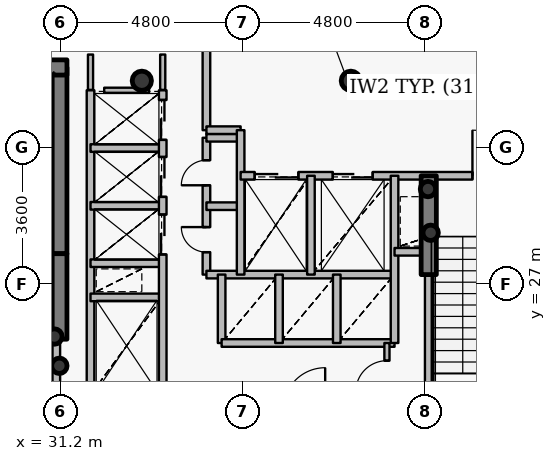
"""IFC4 building model, lengths in metres.
Left out: names, types, materials, properties, quantities, classifications, styles, units other than length and angle.
Written with IfcOpenShell. Run it as: python <this file> out.ifc"""

import sys

from ifc_helpers import new_model, si_unit, direction, frame, frame_2d, origin, origin_2d, place, context, subcontext, project, spatial, rectangle, hollow_circle, extrude, source, transform, mapped, element, fill, save


model = new_model("IFC4")
c1 = context("Model", 3, precision=1e-05, world=origin(), true_north=direction((0.0, 1.0)))
c2 = subcontext(c1, "Body", "Model", "MODEL_VIEW")
j1 = project(units=[si_unit("LENGTHUNIT", "METRE"), si_unit("PLANEANGLEUNIT", "RADIAN")], contexts=[c1])
p1 = place(None, origin())
s1 = spatial("IfcSite", under=j1, at=p1, CompositionType="ELEMENT")
p2 = place(p1, origin())
s2 = spatial("IfcBuilding", under=s1, at=p2, CompositionType="ELEMENT")
p3 = place(p2, frame((0.0, 0.0, 225.3)))
s3 = spatial("IfcBuildingStorey", under=s2, at=p3, CompositionType="ELEMENT", Elevation=225.3)
for number, where, z_axis, x_axis in (
    (1, (38.85, 32.35, 0.0), (0.0, 0.0, 1.0), (1.0, 0.0, 0.0)),
    (2, (33.35, 32.35, 0.0), (0.0, 0.0, 1.0), (1.0, 0.0, 0.0)),
):
    element("IfcColumn", number, at=place(p3, frame(where, z_axis=z_axis, x_axis=x_axis)), inside=s3, PredefinedType="COLUMN", context=c2, shape_type="SweptSolid", body=[
        extrude(hollow_circle(Radius=0.254, WallThickness=0.02, at=origin_2d()), origin(), (0.0, 0.0, 1.0), 3.75),
    ])
p4 = place(p3, frame((31.18, 27.8, 0.0), z_axis=(0.0, 0.0, 1.0), x_axis=(0.0, 1.0, 0.0)))
e3 = element("IfcWall", 3, at=p4, inside=s3, PredefinedType="SHEAR", context=c2, shape_type="SweptSolid", body=[
    extrude(rectangle(XDim=4.9, YDim=0.4, at=frame_2d((2.45, 0.0))), origin(), (0.0, 0.0, 1.0), 3.75),
])
p5 = place(p3, frame((27.28, 32.7, 0.0), z_axis=(0.0, 0.0, 1.0), x_axis=(1.0, 0.0, 0.0)))
e4 = element("IfcWall", 4, at=p5, inside=s3, PredefinedType="SHEAR", context=c2, shape_type="SweptSolid", body=[
    extrude(rectangle(XDim=4.1, YDim=0.4, at=frame_2d((2.05, 0.0))), origin(), (0.0, 0.0, 1.0), 3.75),
])
for number, where, z_axis, x_axis in (
    (5, (31.05, 25.62, 0.0), (0.0, 0.0, 1.0), (1.0, 0.0, 0.0)),
    (6, (31.18, 24.85, 0.0), (0.0, 0.0, 1.0), (1.0, 0.0, 0.0)),
    (7, (40.95, 28.35, 0.0), (0.0, 0.0, 1.0), (1.0, 0.0, 0.0)),
    (8, (40.88, 29.5, 0.0), (0.0, 0.0, 1.0), (1.0, 0.0, 0.0)),
):
    element("IfcColumn", number, at=place(p3, frame(where, z_axis=z_axis, x_axis=x_axis)), inside=s3, PredefinedType="COLUMN", context=c2, shape_type="SweptSolid", body=[
        extrude(hollow_circle(Radius=0.203, WallThickness=0.016, at=origin_2d()), origin(), (0.0, 0.0, 1.0), 3.75),
    ])
p6 = place(p3, frame((31.18, 25.55, 0.0), z_axis=(0.0, 0.0, 1.0), x_axis=(0.0, 1.0, 0.0)))
e9 = element("IfcWall", 9, at=p6, inside=s3, PredefinedType="SHEAR", context=c2, shape_type="SweptSolid", body=[
    extrude(rectangle(XDim=2.25, YDim=0.4, at=frame_2d((1.125, 0.0))), origin(), (0.0, 0.0, 1.0), 3.1),
])
p7 = place(p3, frame((40.9, 27.25, 0.0), z_axis=(0.0, 0.0, 1.0), x_axis=(0.0, 1.0, 0.0)))
e10 = element("IfcWall", 10, at=p7, inside=s3, PredefinedType="SHEAR", context=c2, shape_type="SweptSolid", body=[
    extrude(rectangle(XDim=2.6, YDim=0.4, at=frame_2d((1.3, 0.0))), origin(), (0.0, 0.0, 1.0), 3.1),
])
p8 = place(p3, frame((31.1, 24.1, 0.0), z_axis=(0.0, 0.0, 1.0), x_axis=(0.0, 1.0, 0.0)))
e11 = element("IfcWall", 11, at=p8, inside=s3, PredefinedType="PARTITIONING", context=c2, shape_type="SweptSolid", body=[
    extrude(rectangle(XDim=1.44, YDim=0.2, at=frame_2d((0.72, 0.0))), origin(), (0.0, 0.0, 1.0), 3.5),
])
p9 = place(p3, frame((32.0, 24.1, 0.0), z_axis=(0.0, 0.0, 1.0), x_axis=(0.0, 1.0, 0.0)))
e12 = element("IfcWall", 12, at=p9, inside=s3, PredefinedType="PARTITIONING", context=c2, shape_type="SweptSolid", body=[
    extrude(rectangle(XDim=8.0, YDim=0.2, at=frame_2d((4.0, 0.0))), origin(), (0.0, 0.0, 1.0), 3.5),
])
for number, where, z_axis, x_axis in (
    (13, (32.0, 26.65, 0.0), (0.0, 0.0, 1.0), (1.0, 0.0, 0.0)),
    (14, (32.0, 27.55, 0.0), (0.0, 0.0, 1.0), (1.0, 0.0, 0.0)),
    (15, (32.0, 29.06, 0.0), (0.0, 0.0, 1.0), (1.0, 0.0, 0.0)),
    (16, (32.0, 30.58, 0.0), (0.0, 0.0, 1.0), (1.0, 0.0, 0.0)),
):
    element("IfcWall", number, at=place(p3, frame(where, z_axis=z_axis, x_axis=x_axis)), inside=s3, PredefinedType="PARTITIONING", context=c2, shape_type="SweptSolid", body=[
        extrude(rectangle(XDim=1.9, YDim=0.2, at=frame_2d((0.95, 0.0))), origin(), (0.0, 0.0, 1.0), 3.085),
    ])
p10 = place(p3, frame((33.9, 20.7, 0.0), z_axis=(0.0, 0.0, 1.0), x_axis=(0.0, 1.0, 0.0)))
e17 = element("IfcWall", 17, at=p10, inside=s3, PredefinedType="PARTITIONING", context=c2, shape_type="SweptSolid", body=[
    extrude(rectangle(XDim=11.4, YDim=0.2, at=frame_2d((5.7, 0.0))), origin(), (0.0, 0.0, 1.0), 3.085),
])
p11 = place(p10, frame((7.08, 0.0, 0.0)))
e18 = element("IfcOpeningElement", 18, at=p11, cuts=e17, PredefinedType="OPENING", context=c2, shape_type="SweptSolid", body=[
    extrude(rectangle(XDim=1.05, YDim=2.15, at=origin_2d()), frame((0.525, 0.11, 1.075), z_axis=(0.0, -1.0, 0.0), x_axis=(1.0, 0.0, 0.0)), (0.0, 0.0, 1.0), 0.22),
])
p12 = place(p10, frame((8.595, 0.0, 0.0)))
e19 = element("IfcOpeningElement", 19, at=p12, cuts=e17, PredefinedType="OPENING", context=c2, shape_type="SweptSolid", body=[
    extrude(rectangle(XDim=1.05, YDim=2.15, at=origin_2d()), frame((0.525, 0.11, 1.075), z_axis=(0.0, -1.0, 0.0), x_axis=(1.0, 0.0, 0.0)), (0.0, 0.0, 1.0), 0.22),
])
p13 = place(p10, frame((10.095, 0.0, 0.0)))
e20 = element("IfcOpeningElement", 20, at=p13, cuts=e17, PredefinedType="OPENING", context=c2, shape_type="SweptSolid", body=[
    extrude(rectangle(XDim=1.05, YDim=2.15, at=origin_2d()), frame((0.525, 0.11, 1.075), z_axis=(0.0, -1.0, 0.0), x_axis=(1.0, 0.0, 0.0)), (0.0, 0.0, 1.0), 0.22),
])
p14 = place(p3, frame((35.05, 27.25, 0.0), z_axis=(0.0, 0.0, 1.0), x_axis=(0.0, 1.0, 0.0)))
e21 = element("IfcWall", 21, at=p14, inside=s3, PredefinedType="PARTITIONING", context=c2, shape_type="SweptSolid", body=[
    extrude(rectangle(XDim=3.6, YDim=0.2, at=frame_2d((1.8, 0.0))), origin(), (0.0, 0.0, 1.0), 3.5),
])
p15 = place(p14, frame((0.59, 0.0, 0.0)))
e22 = element("IfcOpeningElement", 22, at=p15, cuts=e21, PredefinedType="OPENING", context=c2, shape_type="SweptSolid", body=[
    extrude(rectangle(XDim=0.66, YDim=2.05, at=origin_2d()), frame((0.33, 0.11, 1.025), z_axis=(0.0, -1.0, 0.0), x_axis=(1.0, 0.0, 0.0)), (0.0, 0.0, 1.0), 0.22),
])
p16 = place(p14, frame((2.35, 0.0, 0.0)))
e23 = element("IfcOpeningElement", 23, at=p16, cuts=e21, PredefinedType="OPENING", context=c2, shape_type="SweptSolid", body=[
    extrude(rectangle(XDim=0.66, YDim=2.05, at=origin_2d()), frame((0.33, 0.11, 1.025), z_axis=(0.0, -1.0, 0.0), x_axis=(1.0, 0.0, 0.0)), (0.0, 0.0, 1.0), 0.22),
])
p17 = place(p3, frame((35.05, 27.25, 0.0), z_axis=(0.0, 0.0, 1.0), x_axis=(1.0, 0.0, 0.0)))
e24 = element("IfcWall", 24, at=p17, inside=s3, PredefinedType="PARTITIONING", context=c2, shape_type="SweptSolid", body=[
    extrude(rectangle(XDim=4.95, YDim=0.2, at=frame_2d((2.475, 0.0))), origin(), (0.0, 0.0, 1.0), 3.085),
])
for number, where, z_axis, x_axis in (
    (25, (35.05, 29.05, 0.0), (0.0, 0.0, 1.0), (1.0, 0.0, 0.0)),
    (26, (35.05, 30.85, 0.0), (0.0, 0.0, 1.0), (1.0, 0.0, 0.0)),
):
    element("IfcWall", number, at=place(p3, frame(where, z_axis=z_axis, x_axis=x_axis)), inside=s3, PredefinedType="PARTITIONING", context=c2, shape_type="SweptSolid", body=[
        extrude(rectangle(XDim=0.9, YDim=0.2, at=frame_2d((0.45, 0.0))), origin(), (0.0, 0.0, 1.0), 3.5),
    ])
p18 = place(p3, frame((35.05, 31.05, 0.0), z_axis=(0.0, 0.0, 1.0), x_axis=(0.0, 1.0, 0.0)))
e27 = element("IfcWall", 27, at=p18, inside=s3, PredefinedType="PARTITIONING", context=c2, shape_type="SweptSolid", body=[
    extrude(rectangle(XDim=2.25, YDim=0.2, at=frame_2d((1.125, 0.0))), origin(), (0.0, 0.0, 1.0), 3.085),
])
p19 = place(p3, frame((35.05, 31.05, 0.0), z_axis=(0.0, 0.0, 1.0), x_axis=(1.0, 0.0, 0.0)))
e28 = element("IfcWall", 28, at=p19, inside=s3, PredefinedType="PARTITIONING", context=c2, shape_type="SweptSolid", body=[
    extrude(rectangle(XDim=0.9, YDim=0.2, at=frame_2d((0.45, 0.0))), origin(), (0.0, 0.0, 1.0), 3.5),
])
p20 = place(p3, frame((35.45, 25.45, 0.0), z_axis=(0.0, 0.0, 1.0), x_axis=(0.0, 1.0, 0.0)))
e29 = element("IfcWall", 29, at=p20, inside=s3, PredefinedType="PARTITIONING", context=c2, shape_type="SweptSolid", body=[
    extrude(rectangle(XDim=1.8, YDim=0.2, at=frame_2d((0.9, 0.0))), origin(), (0.0, 0.0, 1.0), 3.5),
])
p21 = place(p3, frame((35.45, 25.45, 0.0), z_axis=(0.0, 0.0, 1.0), x_axis=(1.0, 0.0, 0.0)))
e30 = element("IfcWall", 30, at=p21, inside=s3, PredefinedType="PARTITIONING", context=c2, shape_type="SweptSolid", body=[
    extrude(rectangle(XDim=4.55, YDim=0.2, at=frame_2d((2.275, 0.0))), origin(), (0.0, 0.0, 1.0), 3.085),
])
p22 = place(p3, frame((35.95, 27.25, 0.0), z_axis=(0.0, 0.0, 1.0), x_axis=(0.0, 1.0, 0.0)))
e31 = element("IfcWall", 31, at=p22, inside=s3, PredefinedType="PARTITIONING", context=c2, shape_type="SweptSolid", body=[
    extrude(rectangle(XDim=3.8, YDim=0.2, at=frame_2d((1.9, 0.0))), origin(), (0.0, 0.0, 1.0), 3.5),
])
p23 = place(p3, frame((35.95, 29.85, 0.0), z_axis=(0.0, 0.0, 1.0), x_axis=(1.0, 0.0, 0.0)))
e32 = element("IfcWall", 32, at=p23, inside=s3, PredefinedType="PARTITIONING", context=c2, shape_type="SweptSolid", body=[
    extrude(rectangle(XDim=8.49, YDim=0.2, at=frame_2d((4.245, 0.0))), origin(), (0.0, 0.0, 1.0), 3.085),
])
p24 = place(p23, frame((6.1, 0.0, 0.0)))
e33 = element("IfcOpeningElement", 33, at=p24, cuts=e32, PredefinedType="OPENING", context=c2, shape_type="SweptSolid", body=[
    extrude(rectangle(XDim=1.2, YDim=2.15, at=origin_2d()), frame((0.6, 0.11, 1.075), z_axis=(0.0, -1.0, 0.0), x_axis=(1.0, 0.0, 0.0)), (0.0, 0.0, 1.0), 0.22),
])
p25 = place(p23, frame((0.37, 0.0, 0.0)))
e34 = element("IfcOpeningElement", 34, at=p25, cuts=e32, PredefinedType="OPENING", context=c2, shape_type="SweptSolid", body=[
    extrude(rectangle(XDim=1.15, YDim=2.15, at=origin_2d()), frame((0.575, 0.11, 1.075), z_axis=(0.0, -1.0, 0.0), x_axis=(1.0, 0.0, 0.0)), (0.0, 0.0, 1.0), 0.22),
])
p26 = place(p23, frame((2.425, 0.0, 0.0)))
e35 = element("IfcOpeningElement", 35, at=p26, cuts=e32, PredefinedType="OPENING", context=c2, shape_type="SweptSolid", body=[
    extrude(rectangle(XDim=1.05, YDim=2.15, at=origin_2d()), frame((0.525, 0.11, 1.075), z_axis=(0.0, -1.0, 0.0), x_axis=(1.0, 0.0, 0.0)), (0.0, 0.0, 1.0), 0.22),
])
p27 = place(p3, frame((36.96, 25.45, 0.0), z_axis=(0.0, 0.0, 1.0), x_axis=(0.0, 1.0, 0.0)))
e36 = element("IfcWall", 36, at=p27, inside=s3, PredefinedType="PARTITIONING", context=c2, shape_type="SweptSolid", body=[
    extrude(rectangle(XDim=1.8, YDim=0.2, at=frame_2d((0.9, 0.0))), origin(), (0.0, 0.0, 1.0), 3.5),
])
p28 = place(p3, frame((37.8, 27.25, 0.0), z_axis=(0.0, 0.0, 1.0), x_axis=(0.0, 1.0, 0.0)))
e37 = element("IfcWall", 37, at=p28, inside=s3, PredefinedType="PARTITIONING", context=c2, shape_type="SweptSolid", body=[
    extrude(rectangle(XDim=2.6, YDim=0.2, at=frame_2d((1.3, 0.0))), origin(), (0.0, 0.0, 1.0), 3.5),
])
p29 = place(p3, frame((38.48, 25.45, 0.0), z_axis=(0.0, 0.0, 1.0), x_axis=(0.0, 1.0, 0.0)))
e38 = element("IfcWall", 38, at=p29, inside=s3, PredefinedType="PARTITIONING", context=c2, shape_type="SweptSolid", body=[
    extrude(rectangle(XDim=1.8, YDim=0.2, at=frame_2d((0.9, 0.0))), origin(), (0.0, 0.0, 1.0), 3.5),
])
p30 = place(p3, frame((39.8, 23.7, 0.0), z_axis=(0.0, 0.0, 1.0), x_axis=(0.0, 1.0, 0.0)))
e39 = element("IfcWall", 39, at=p30, inside=s3, PredefinedType="PARTITIONING", context=c2, shape_type="SweptSolid", body=[
    extrude(rectangle(XDim=1.75, YDim=0.135, at=frame_2d((0.875, 0.0))), origin(), (0.0, 0.0, 1.0), 3.5),
])
p31 = place(p30, frame((0.465, 0.0, 0.0)))
e40 = element("IfcOpeningElement", 40, at=p31, cuts=e39, PredefinedType="OPENING", context=c2, shape_type="SweptSolid", body=[
    extrude(rectangle(XDim=0.82, YDim=2.1, at=origin_2d()), frame((0.41, 0.078, 1.05), z_axis=(0.0, -1.0, 0.0), x_axis=(1.0, 0.0, 0.0)), (0.0, 0.0, 1.0), 0.155),
])
p32 = place(p3, frame((40.0, 25.45, 0.0), z_axis=(0.0, 0.0, 1.0), x_axis=(0.0, 1.0, 0.0)))
e41 = element("IfcWall", 41, at=p32, inside=s3, PredefinedType="PARTITIONING", context=c2, shape_type="SweptSolid", body=[
    extrude(rectangle(XDim=4.4, YDim=0.2, at=frame_2d((2.2, 0.0))), origin(), (0.0, 0.0, 1.0), 3.5),
])
p33 = place(p3, frame((40.0, 27.85, 0.0), z_axis=(0.0, 0.0, 1.0), x_axis=(1.0, 0.0, 0.0)))
e42 = element("IfcWall", 42, at=p33, inside=s3, PredefinedType="PARTITIONING", context=c2, shape_type="SweptSolid", body=[
    extrude(rectangle(XDim=0.9, YDim=0.2, at=frame_2d((0.45, 0.0))), origin(), (0.0, 0.0, 1.0), 3.5),
])
p34 = place(p3, frame((40.9, 21.33, 0.0), z_axis=(0.0, 0.0, 1.0), x_axis=(0.0, 1.0, 0.0)))
e43 = element("IfcWall", 43, at=p34, inside=s3, PredefinedType="PARTITIONING", context=c2, shape_type="SweptSolid", body=[
    extrude(rectangle(XDim=5.91, YDim=0.2, at=frame_2d((2.955, 0.0))), origin(), (0.0, 0.0, 1.0), 3.035),
])
p35 = place(p3, frame((32.36, 32.1, 0.0), z_axis=(0.0, 0.0, 1.0), x_axis=(1.0, 0.0, 0.0)))
e44 = element("IfcWall", 44, at=p35, inside=s3, PredefinedType="PARTITIONING", context=c2, shape_type="SweptSolid", body=[
    extrude(rectangle(XDim=1.18, YDim=0.135, at=frame_2d((0.59, 0.0))), origin(), (0.0, 0.0, 1.0), 3.085),
])
p36 = place(p3, frame((32.0, 33.04, 0.0), z_axis=(0.0, 0.0, 1.0), x_axis=(0.0, -1.0, 0.0)))
e45 = element("IfcWall", 45, at=p36, inside=s3, PredefinedType="PARTITIONING", context=c2, shape_type="SweptSolid", body=[
    extrude(rectangle(XDim=0.93, YDim=0.135, at=frame_2d((0.465, 0.0))), origin(), (0.0, 0.0, 1.0), 3.035),
])
p37 = place(p3, frame((33.9, 32.11, 0.0), z_axis=(0.0, 0.0, 1.0), x_axis=(0.0, 1.0, 0.0)))
e46 = element("IfcWall", 46, at=p37, inside=s3, PredefinedType="PARTITIONING", context=c2, shape_type="SweptSolid", body=[
    extrude(rectangle(XDim=0.93, YDim=0.135, at=frame_2d((0.465, 0.0))), origin(), (0.0, 0.0, 1.0), 3.085),
])
m1 = source(origin(), c2, "Body", "SweptSolid", [
    extrude(rectangle(XDim=1.2, YDim=2.15, at=origin_2d()), frame((0.6, 0.025, 1.075), z_axis=(0.0, -1.0, 0.0), x_axis=(1.0, 0.0, 0.0)), (0.0, 0.0, 1.0), 0.05),
])
p38 = place(p24, origin())
e47 = element("IfcDoor", 47, at=p38, inside=s3, OperationType="SINGLE_SWING_LEFT", PredefinedType="DOOR", context=c2, shape_type="MappedRepresentation", body=[
    mapped(m1, transform((0.0, 0.0, 0.0), x_axis=(1.0, 0.0, 0.0), y_axis=(0.0, 1.0, 0.0), z_axis=(0.0, 0.0, 1.0), scale=1.0)),
])
fill(e33, e47)
m2 = source(origin(), c2, "Body", "SweptSolid", [
    extrude(rectangle(XDim=1.15, YDim=2.15, at=origin_2d()), frame((0.575, 0.025, 1.075), z_axis=(0.0, -1.0, 0.0), x_axis=(1.0, 0.0, 0.0)), (0.0, 0.0, 1.0), 0.05),
])
p39 = place(p25, origin())
e48 = element("IfcDoor", 48, at=p39, inside=s3, OperationType="DOUBLE_DOOR_SLIDING", PredefinedType="USERDEFINED", context=c2, shape_type="MappedRepresentation", body=[
    mapped(m2, transform((0.0, 0.0, 0.0), x_axis=(1.0, 0.0, 0.0), y_axis=(0.0, 1.0, 0.0), z_axis=(0.0, 0.0, 1.0), scale=1.0)),
])
fill(e34, e48)
m3 = source(origin(), c2, "Body", "SweptSolid", [
    extrude(rectangle(XDim=1.05, YDim=2.15, at=origin_2d()), frame((0.525, 0.025, 1.075), z_axis=(0.0, -1.0, 0.0), x_axis=(1.0, 0.0, 0.0)), (0.0, 0.0, 1.0), 0.05),
])
p40 = place(p26, origin())
e49 = element("IfcDoor", 49, at=p40, inside=s3, OperationType="DOUBLE_DOOR_SLIDING", PredefinedType="USERDEFINED", context=c2, shape_type="MappedRepresentation", body=[
    mapped(m3, transform((0.0, 0.0, 0.0), x_axis=(1.0, 0.0, 0.0), y_axis=(0.0, 1.0, 0.0), z_axis=(0.0, 0.0, 1.0), scale=1.0)),
])
fill(e35, e49)
p41 = place(p11, origin())
e50 = element("IfcDoor", 50, at=p41, inside=s3, OperationType="DOUBLE_DOOR_SLIDING", PredefinedType="USERDEFINED", context=c2, shape_type="MappedRepresentation", body=[
    mapped(m3, transform((0.0, 0.0, 0.0), x_axis=(1.0, 0.0, 0.0), y_axis=(0.0, 1.0, 0.0), z_axis=(0.0, 0.0, 1.0), scale=1.0)),
])
fill(e18, e50)
p42 = place(p12, origin())
e51 = element("IfcDoor", 51, at=p42, inside=s3, OperationType="DOUBLE_DOOR_SLIDING", PredefinedType="USERDEFINED", context=c2, shape_type="MappedRepresentation", body=[
    mapped(m3, transform((0.0, 0.0, 0.0), x_axis=(1.0, 0.0, 0.0), y_axis=(0.0, 1.0, 0.0), z_axis=(0.0, 0.0, 1.0), scale=1.0)),
])
fill(e19, e51)
p43 = place(p13, origin())
e52 = element("IfcDoor", 52, at=p43, inside=s3, OperationType="DOUBLE_DOOR_SLIDING", PredefinedType="USERDEFINED", context=c2, shape_type="MappedRepresentation", body=[
    mapped(m3, transform((0.0, 0.0, 0.0), x_axis=(1.0, 0.0, 0.0), y_axis=(0.0, 1.0, 0.0), z_axis=(0.0, 0.0, 1.0), scale=1.0)),
])
fill(e20, e52)
m4 = source(origin(), c2, "Body", "SweptSolid", [
    extrude(rectangle(XDim=0.66, YDim=2.05, at=origin_2d()), frame((0.33, 0.025, 1.025), z_axis=(0.0, -1.0, 0.0), x_axis=(1.0, 0.0, 0.0)), (0.0, 0.0, 1.0), 0.05),
])
p44 = place(p15, origin())
e53 = element("IfcDoor", 53, at=p44, inside=s3, OperationType="SINGLE_SWING_RIGHT", PredefinedType="USERDEFINED", context=c2, shape_type="MappedRepresentation", body=[
    mapped(m4, transform((0.0, 0.0, 0.0), x_axis=(1.0, 0.0, 0.0), y_axis=(0.0, 1.0, 0.0), z_axis=(0.0, 0.0, 1.0), scale=1.0)),
])
fill(e22, e53)
p45 = place(p16, origin())
e54 = element("IfcDoor", 54, at=p45, inside=s3, OperationType="SINGLE_SWING_LEFT", PredefinedType="USERDEFINED", context=c2, shape_type="MappedRepresentation", body=[
    mapped(m4, transform((0.0, 0.0, 0.0), x_axis=(1.0, 0.0, 0.0), y_axis=(0.0, 1.0, 0.0), z_axis=(0.0, 0.0, 1.0), scale=1.0)),
])
fill(e23, e54)
m5 = source(origin(), c2, "Body", "SweptSolid", [
    extrude(rectangle(XDim=0.82, YDim=2.1, at=origin_2d()), frame((0.41, 0.025, 1.05), z_axis=(0.0, -1.0, 0.0), x_axis=(1.0, 0.0, 0.0)), (0.0, 0.0, 1.0), 0.05),
])
p46 = place(p31, origin())
e55 = element("IfcDoor", 55, at=p46, inside=s3, OperationType="SINGLE_SWING_LEFT", PredefinedType="DOOR", context=c2, shape_type="MappedRepresentation", body=[
    mapped(m5, transform((0.0, 0.0, 0.0), x_axis=(1.0, 0.0, 0.0), y_axis=(0.0, 1.0, 0.0), z_axis=(0.0, 0.0, 1.0), scale=1.0)),
])
fill(e40, e55)
save(model, sys.argv[1])
